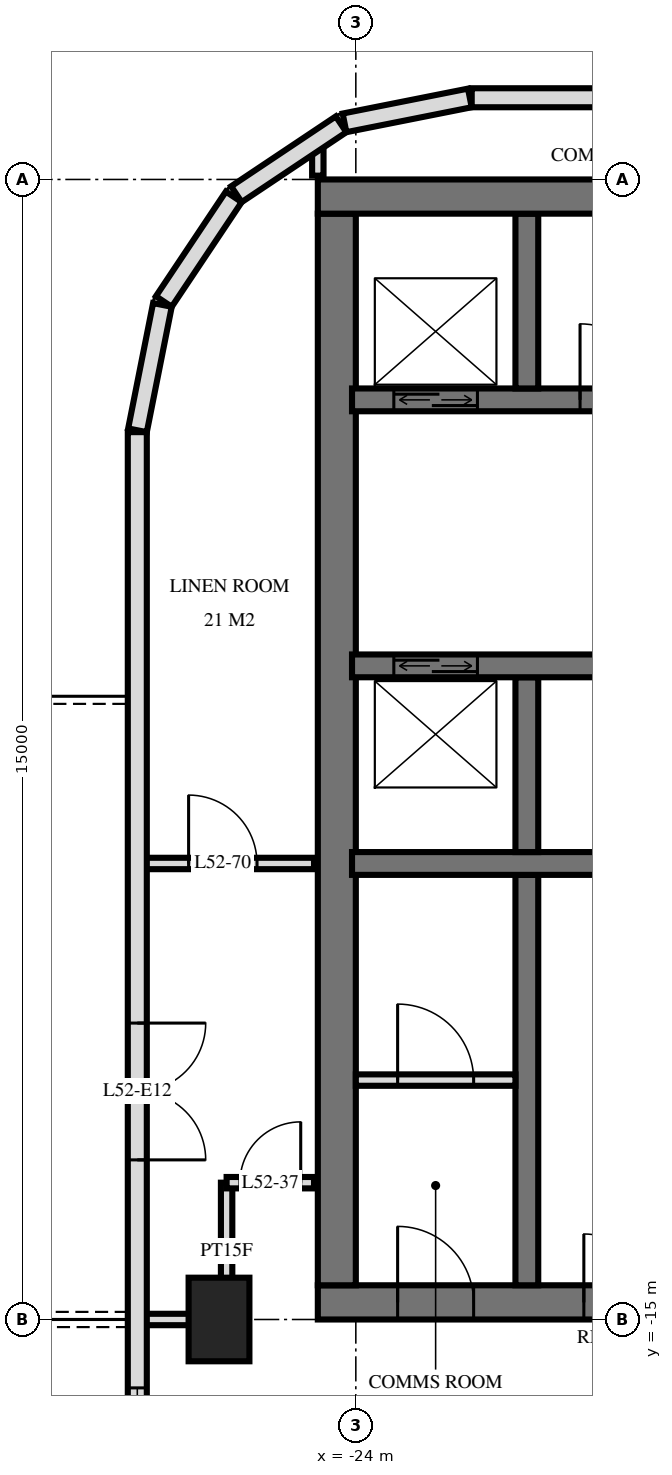
"""IFC4 building model, lengths in metres.
Left out: names, types, materials, properties, quantities, classifications, styles, units other than length and angle.
Written with IfcOpenShell. Run it as: python <this file> out.ifc"""

import sys

from ifc_helpers import new_model, si_unit, direction, frame, frame_2d, origin, origin_2d, place, context, subcontext, project, spatial, rectangle, extrude, element, fill, save


model = new_model("IFC4")
c1 = context("Model", 3, precision=1e-05, world=origin(), true_north=direction((0.0, 1.0)))
c2 = subcontext(c1, "Body", "Model", "MODEL_VIEW")
j1 = project(units=[si_unit("LENGTHUNIT", "METRE"), si_unit("PLANEANGLEUNIT", "RADIAN")], contexts=[c1])
p1 = place(None, origin())
s1 = spatial("IfcSite", under=j1, at=p1, CompositionType="ELEMENT")
p2 = place(p1, origin())
s2 = spatial("IfcBuilding", under=s1, at=p2, CompositionType="ELEMENT")
p3 = place(p2, frame((0.0, 0.0, 201.1)))
s3 = spatial("IfcBuildingStorey", under=s2, at=p3, CompositionType="ELEMENT", Elevation=201.1)
p4 = place(p3, frame((-25.8, -15.0, 0.0), z_axis=(0.0, 0.0, 1.0), x_axis=(0.0, 1.0, 0.0)))
e1 = element("IfcColumn", 1, at=p4, inside=s3, PredefinedType="COLUMN", context=c2, shape_type="SweptSolid", body=[
    extrude(rectangle(XDim=1.1, YDim=0.8, at=origin_2d()), origin(), (0.0, 0.0, 1.0), 3.5),
])
p5 = place(p3, frame((-24.5, -0.225, 0.0), z_axis=(0.0, 0.0, 1.0), x_axis=(1.0, 0.0, 0.0)))
e2 = element("IfcWall", 2, at=p5, inside=s3, PredefinedType="SHEAR", context=c2, shape_type="SweptSolid", body=[
    extrude(rectangle(XDim=14.5, YDim=0.45, at=frame_2d((7.25, 0.0))), origin(), (0.0, 0.0, 1.0), 3.5),
])
p6 = place(p3, frame((-24.5, -14.775, 0.0), z_axis=(0.0, 0.0, 1.0), x_axis=(1.0, 0.0, 0.0)))
e3 = element("IfcWall", 3, at=p6, inside=s3, PredefinedType="SHEAR", context=c2, shape_type="SweptSolid", body=[
    extrude(rectangle(XDim=14.5, YDim=0.45, at=frame_2d((7.25, 0.0))), origin(), (0.0, 0.0, 1.0), 3.5),
])
p7 = place(p6, frame((6.2, 0.0, 0.0)))
e4 = element("IfcOpeningElement", 4, at=p7, cuts=e3, PredefinedType="OPENING", context=c2, shape_type="SweptSolid", body=[
    extrude(rectangle(XDim=1.2, YDim=2.1, at=frame_2d((0.6, 1.05))), frame((0.0, 0.235, 0.0), z_axis=(0.0, -1.0, 0.0), x_axis=(1.0, 0.0, 0.0)), (0.0, 0.0, 1.0), 0.47),
])
p8 = place(p6, frame((9.25, 0.0, 0.0)))
e5 = element("IfcOpeningElement", 5, at=p8, cuts=e3, PredefinedType="OPENING", context=c2, shape_type="SweptSolid", body=[
    extrude(rectangle(XDim=1.1, YDim=2.1, at=frame_2d((0.55, 1.05))), frame((0.0, 0.235, 0.0), z_axis=(0.0, -1.0, 0.0), x_axis=(1.0, 0.0, 0.0)), (0.0, 0.0, 1.0), 0.47),
])
p9 = place(p6, frame((3.5, 0.0, 0.0)))
e6 = element("IfcOpeningElement", 6, at=p9, cuts=e3, PredefinedType="OPENING", context=c2, shape_type="SweptSolid", body=[
    extrude(rectangle(XDim=0.9, YDim=2.1, at=frame_2d((0.45, 1.05))), frame((0.0, 0.235, 0.0), z_axis=(0.0, -1.0, 0.0), x_axis=(1.0, 0.0, 0.0)), (0.0, 0.0, 1.0), 0.47),
])
p10 = place(p6, frame((1.05, 0.0, 0.0)))
e7 = element("IfcOpeningElement", 7, at=p10, cuts=e3, PredefinedType="OPENING", context=c2, shape_type="SweptSolid", body=[
    extrude(rectangle(XDim=1.0, YDim=2.1, at=frame_2d((0.5, 1.05))), frame((0.0, 0.235, 0.0), z_axis=(0.0, -1.0, 0.0), x_axis=(1.0, 0.0, 0.0)), (0.0, 0.0, 1.0), 0.47),
])
p11 = place(p3, frame((-24.25, -14.55, 0.0), z_axis=(0.0, 0.0, 1.0), x_axis=(0.0, 1.0, 0.0)))
e8 = element("IfcWall", 8, at=p11, inside=s3, PredefinedType="SHEAR", context=c2, shape_type="SweptSolid", body=[
    extrude(rectangle(XDim=14.1, YDim=0.5, at=frame_2d((7.05, 0.0))), origin(), (0.0, 0.0, 1.0), 3.5),
])
p12 = place(p3, frame((-24.05, -2.9, 0.0), z_axis=(0.0, 0.0, 1.0), x_axis=(1.0, 0.0, 0.0)))
e9 = element("IfcWall", 9, at=p12, inside=s3, PredefinedType="SHEAR", context=c2, shape_type="SweptSolid", body=[
    extrude(rectangle(XDim=13.7, YDim=0.3, at=frame_2d((6.85, 0.0))), origin(), (0.0, 0.0, 1.0), 3.5),
])
p13 = place(p12, frame((0.55, 0.0, 0.0)))
e10 = element("IfcOpeningElement", 10, at=p13, cuts=e9, PredefinedType="OPENING", context=c2, shape_type="SweptSolid", body=[
    extrude(rectangle(XDim=1.1, YDim=2.1, at=frame_2d((0.55, 1.05))), frame((0.0, 0.16, 0.0), z_axis=(0.0, -1.0, 0.0), x_axis=(1.0, 0.0, 0.0)), (0.0, 0.0, 1.0), 0.32),
])
p14 = place(p12, frame((6.613, 0.0, 0.0)))
e11 = element("IfcOpeningElement", 11, at=p14, cuts=e9, PredefinedType="OPENING", context=c2, shape_type="SweptSolid", body=[
    extrude(rectangle(XDim=0.9, YDim=2.1, at=frame_2d((0.45, 1.05))), frame((0.0, 0.16, 0.0), z_axis=(0.0, -1.0, 0.0), x_axis=(1.0, 0.0, 0.0)), (0.0, 0.0, 1.0), 0.32),
])
p15 = place(p12, frame((5.188, 0.0, 0.0)))
e12 = element("IfcOpeningElement", 12, at=p15, cuts=e9, PredefinedType="OPENING", context=c2, shape_type="SweptSolid", body=[
    extrude(rectangle(XDim=0.9, YDim=2.1, at=frame_2d((0.45, 1.05))), frame((0.0, 0.16, 0.0), z_axis=(0.0, -1.0, 0.0), x_axis=(1.0, 0.0, 0.0)), (0.0, 0.0, 1.0), 0.32),
])
p16 = place(p12, frame((12.562, 0.0, 0.0)))
e13 = element("IfcOpeningElement", 13, at=p16, cuts=e9, PredefinedType="OPENING", context=c2, shape_type="SweptSolid", body=[
    extrude(rectangle(XDim=1.0, YDim=2.1, at=frame_2d((0.5, 1.05))), frame((0.0, 0.16, 0.0), z_axis=(0.0, -1.0, 0.0), x_axis=(1.0, 0.0, 0.0)), (0.0, 0.0, 1.0), 0.32),
])
p17 = place(p12, frame((11.137, 0.0, 0.0)))
e14 = element("IfcOpeningElement", 14, at=p17, cuts=e9, PredefinedType="OPENING", context=c2, shape_type="SweptSolid", body=[
    extrude(rectangle(XDim=1.0, YDim=2.1, at=frame_2d((0.5, 1.05))), frame((0.0, 0.16, 0.0), z_axis=(0.0, -1.0, 0.0), x_axis=(1.0, 0.0, 0.0)), (0.0, 0.0, 1.0), 0.32),
])
p18 = place(p12, frame((8.85, 0.0, 0.0)))
e15 = element("IfcOpeningElement", 15, at=p18, cuts=e9, PredefinedType="OPENING", context=c2, shape_type="SweptSolid", body=[
    extrude(rectangle(XDim=1.0, YDim=2.1, at=frame_2d((0.5, 1.05))), frame((0.0, 0.16, 0.0), z_axis=(0.0, -1.0, 0.0), x_axis=(1.0, 0.0, 0.0)), (0.0, 0.0, 1.0), 0.32),
])
p19 = place(p12, frame((3.0, 0.0, 0.0)))
e16 = element("IfcOpeningElement", 16, at=p19, cuts=e9, PredefinedType="OPENING", context=c2, shape_type="SweptSolid", body=[
    extrude(rectangle(XDim=1.0, YDim=2.1, at=frame_2d((0.5, 1.05))), frame((0.0, 0.16, 0.0), z_axis=(0.0, -1.0, 0.0), x_axis=(1.0, 0.0, 0.0)), (0.0, 0.0, 1.0), 0.32),
])
p20 = place(p3, frame((-24.05, -6.4, 0.0), z_axis=(0.0, 0.0, 1.0), x_axis=(1.0, 0.0, 0.0)))
e17 = element("IfcWall", 17, at=p20, inside=s3, PredefinedType="SHEAR", context=c2, shape_type="SweptSolid", body=[
    extrude(rectangle(XDim=13.7, YDim=0.3, at=frame_2d((6.85, 0.0))), origin(), (0.0, 0.0, 1.0), 3.5),
])
p21 = place(p20, frame((0.55, 0.0, 0.0)))
e18 = element("IfcOpeningElement", 18, at=p21, cuts=e17, PredefinedType="OPENING", context=c2, shape_type="SweptSolid", body=[
    extrude(rectangle(XDim=1.1, YDim=2.1, at=frame_2d((0.55, 1.05))), frame((0.0, 0.16, 0.0), z_axis=(0.0, -1.0, 0.0), x_axis=(1.0, 0.0, 0.0)), (0.0, 0.0, 1.0), 0.32),
])
p22 = place(p20, frame((5.8, 0.0, 0.0)))
e19 = element("IfcOpeningElement", 19, at=p22, cuts=e17, PredefinedType="OPENING", context=c2, shape_type="SweptSolid", body=[
    extrude(rectangle(XDim=1.1, YDim=2.1, at=frame_2d((0.55, 1.05))), frame((0.0, 0.16, 0.0), z_axis=(0.0, -1.0, 0.0), x_axis=(1.0, 0.0, 0.0)), (0.0, 0.0, 1.0), 0.32),
])
p23 = place(p3, frame((-24.05, -9.0, 0.0), z_axis=(0.0, 0.0, 1.0), x_axis=(1.0, 0.0, 0.0)))
e20 = element("IfcWall", 20, at=p23, inside=s3, PredefinedType="SHEAR", context=c2, shape_type="SweptSolid", body=[
    extrude(rectangle(XDim=13.7, YDim=0.3, at=frame_2d((6.85, 0.0))), origin(), (0.0, 0.0, 1.0), 3.5),
])
p24 = place(p23, frame((8.8, 0.0, 0.0)))
e21 = element("IfcOpeningElement", 21, at=p24, cuts=e20, PredefinedType="OPENING", context=c2, shape_type="SweptSolid", body=[
    extrude(rectangle(XDim=1.1, YDim=2.1, at=frame_2d((0.55, 1.05))), frame((0.0, 0.16, 0.0), z_axis=(0.0, -1.0, 0.0), x_axis=(1.0, 0.0, 0.0)), (0.0, 0.0, 1.0), 0.32),
])
for number, where, z_axis, x_axis in (
    (22, (-21.75, -2.75, 0.0), (0.0, 0.0, 1.0), (0.0, 1.0, 0.0)),
    (23, (-21.75, -8.85, 0.0), (0.0, 0.0, 1.0), (0.0, 1.0, 0.0)),
):
    element("IfcWall", number, at=place(p3, frame(where, z_axis=z_axis, x_axis=x_axis)), inside=s3, PredefinedType="SHEAR", context=c2, shape_type="SweptSolid", body=[
        extrude(rectangle(XDim=2.3, YDim=0.3, at=frame_2d((1.15, 0.0))), origin(), (0.0, 0.0, 1.0), 3.5),
    ])
p25 = place(p3, frame((-21.75, -14.55, 0.0), z_axis=(0.0, 0.0, 1.0), x_axis=(0.0, 1.0, 0.0)))
e24 = element("IfcWall", 24, at=p25, inside=s3, PredefinedType="SHEAR", context=c2, shape_type="SweptSolid", body=[
    extrude(rectangle(XDim=5.4, YDim=0.3, at=frame_2d((2.7, 0.0))), origin(), (0.0, 0.0, 1.0), 3.5),
])
p26 = place(p3, frame((22.475, 1.075, 0.0), z_axis=(0.0, 0.0, 1.0), x_axis=(-1.0, 0.0, 0.0)))
e25 = element("IfcWall", 25, at=p26, inside=s3, PredefinedType="SOLIDWALL", context=c2, shape_type="SweptSolid", body=[
    extrude(rectangle(XDim=44.951, YDim=0.25, at=frame_2d((22.475, 0.0))), origin(), (0.0, 0.0, 1.0), 3.22),
])
p27 = place(p26, frame((13.775, 0.0, 0.9)))
e26 = element("IfcOpeningElement", 26, at=p27, cuts=e25, PredefinedType="OPENING", context=c2, shape_type="SweptSolid", body=[
    extrude(rectangle(XDim=2.4, YDim=1.5, at=frame_2d((1.2, 0.75))), frame((0.0, 0.135, 0.0), z_axis=(0.0, -1.0, 0.0), x_axis=(1.0, 0.0, 0.0)), (0.0, 0.0, 1.0), 0.27),
])
p28 = place(p26, frame((18.275, 0.0, 0.9)))
e27 = element("IfcOpeningElement", 27, at=p28, cuts=e25, PredefinedType="OPENING", context=c2, shape_type="SweptSolid", body=[
    extrude(rectangle(XDim=2.4, YDim=1.5, at=frame_2d((1.2, 0.75))), frame((0.0, 0.135, 0.0), z_axis=(0.0, -1.0, 0.0), x_axis=(1.0, 0.0, 0.0)), (0.0, 0.0, 1.0), 0.27),
])
p29 = place(p26, frame((29.025, 0.0, 0.9)))
e28 = element("IfcOpeningElement", 28, at=p29, cuts=e25, PredefinedType="OPENING", context=c2, shape_type="SweptSolid", body=[
    extrude(rectangle(XDim=2.4, YDim=1.5, at=frame_2d((1.2, 0.75))), frame((0.0, 0.135, 0.0), z_axis=(0.0, -1.0, 0.0), x_axis=(1.0, 0.0, 0.0)), (0.0, 0.0, 1.0), 0.27),
])
p30 = place(p3, frame((-22.5, 1.073, 0.0), z_axis=(0.0, 0.0, 1.0), x_axis=(-0.980803419081, -0.194999110559, 0.0)))
e29 = element("IfcWall", 29, at=p30, inside=s3, PredefinedType="SOLIDWALL", context=c2, shape_type="SweptSolid", body=[
    extrude(rectangle(XDim=1.681, YDim=0.25, at=frame_2d((0.841, 0.0))), origin(), (0.0, 0.0, 1.0), 3.22),
])
for number, where, z_axis, x_axis in (
    (30, (-24.194, 0.726, 0.0), (0.0, 0.0, 1.0), (-0.831, -0.556, 0.0)),
    (31, (-25.606, -0.229, 0.0), (0.0, 0.0, 1.0), (-0.556, -0.831, 0.0)),
):
    element("IfcWall", number, at=place(p3, frame(where, z_axis=z_axis, x_axis=x_axis)), inside=s3, PredefinedType="SOLIDWALL", context=c2, shape_type="SweptSolid", body=[
        extrude(rectangle(XDim=1.656, YDim=0.25, at=frame_2d((0.828, 0.0))), origin(), (0.0, 0.0, 1.0), 3.22),
    ])
p31 = place(p3, frame((-26.545, -1.651, 0.0), z_axis=(0.0, 0.0, 1.0), x_axis=(-0.194999110559, -0.980803419081, 0.0)))
e32 = element("IfcWall", 32, at=p31, inside=s3, PredefinedType="SOLIDWALL", context=c2, shape_type="SweptSolid", body=[
    extrude(rectangle(XDim=1.681, YDim=0.25, at=frame_2d((0.841, 0.0))), origin(), (0.0, 0.0, 1.0), 3.22),
])
p32 = place(p3, frame((-26.875, -3.325, 0.0), z_axis=(0.0, 0.0, 1.0), x_axis=(0.0, -1.0, 0.0)))
e33 = element("IfcWall", 33, at=p32, inside=s3, PredefinedType="SOLIDWALL", context=c2, shape_type="SweptSolid", body=[
    extrude(rectangle(XDim=21.551, YDim=0.25, at=frame_2d((10.775, 0.0))), origin(), (0.0, 0.0, 1.0), 3.22),
])
p33 = place(p32, frame((7.775, 0.0, 0.0)))
e34 = element("IfcOpeningElement", 34, at=p33, cuts=e33, PredefinedType="OPENING", context=c2, shape_type="SweptSolid", body=[
    extrude(rectangle(XDim=1.8, YDim=2.4, at=frame_2d((0.9, 1.2))), frame((0.0, 0.135, 0.0), z_axis=(0.0, -1.0, 0.0), x_axis=(1.0, 0.0, 0.0)), (0.0, 0.0, 1.0), 0.27),
])
p34 = place(p32, frame((12.575, 0.0, 0.9)))
e35 = element("IfcOpeningElement", 35, at=p34, cuts=e33, PredefinedType="OPENING", context=c2, shape_type="SweptSolid", body=[
    extrude(rectangle(XDim=1.2, YDim=1.5, at=frame_2d((0.6, 0.75))), frame((0.0, 0.135, 0.0), z_axis=(0.0, -1.0, 0.0), x_axis=(1.0, 0.0, 0.0)), (0.0, 0.0, 1.0), 0.27),
])
p35 = place(p32, frame((15.275, 0.0, 0.0)))
e36 = element("IfcOpeningElement", 36, at=p35, cuts=e33, PredefinedType="OPENING", context=c2, shape_type="SweptSolid", body=[
    extrude(rectangle(XDim=1.8, YDim=2.4, at=frame_2d((0.9, 1.2))), frame((0.0, 0.135, 0.0), z_axis=(0.0, -1.0, 0.0), x_axis=(1.0, 0.0, 0.0)), (0.0, 0.0, 1.0), 0.27),
])
p36 = place(p32, frame((19.325, 0.0, 0.0)))
e37 = element("IfcOpeningElement", 37, at=p36, cuts=e33, PredefinedType="OPENING", context=c2, shape_type="SweptSolid", body=[
    extrude(rectangle(XDim=1.8, YDim=2.4, at=frame_2d((0.9, 1.2))), frame((0.0, 0.135, 0.0), z_axis=(0.0, -1.0, 0.0), x_axis=(1.0, 0.0, 0.0)), (0.0, 0.0, 1.0), 0.27),
])
p37 = place(p3, frame((-24.0, -11.85, 0.0), z_axis=(0.0, 0.0, 1.0), x_axis=(1.0, 0.0, 0.0)))
e38 = element("IfcWall", 38, at=p37, inside=s3, PredefinedType="PARTITIONING", context=c2, shape_type="SweptSolid", body=[
    extrude(rectangle(XDim=2.1, YDim=0.15, at=frame_2d((1.05, 0.0))), origin(), (0.0, 0.0, 1.0), 3.2),
])
p38 = place(p37, frame((0.55, 0.0, 0.0)))
e39 = element("IfcOpeningElement", 39, at=p38, cuts=e38, PredefinedType="OPENING", context=c2, shape_type="SweptSolid", body=[
    extrude(rectangle(XDim=1.0, YDim=2.1, at=frame_2d((0.5, 1.05))), frame((0.0, 0.085, 0.0), z_axis=(0.0, -1.0, 0.0), x_axis=(1.0, 0.0, 0.0)), (0.0, 0.0, 1.0), 0.17),
])
p39 = place(p3, frame((-24.5, 0.05, 0.0), z_axis=(0.0, 0.0, 1.0), x_axis=(0.0, 1.0, 0.0)))
e40 = element("IfcWall", 40, at=p39, inside=s3, PredefinedType="PARTITIONING", context=c2, shape_type="SweptSolid", body=[
    extrude(rectangle(XDim=0.405, YDim=0.15, at=frame_2d((0.203, 0.0))), origin(), (0.0, 0.0, 1.0), 3.22),
])
p40 = place(p3, frame((-25.7, -15.0, 0.0), z_axis=(0.0, 0.0, 1.0), x_axis=(0.0, 1.0, 0.0)))
e41 = element("IfcWall", 41, at=p40, inside=s3, PredefinedType="PARTITIONING", context=c2, shape_type="SweptSolid", body=[
    extrude(rectangle(XDim=1.8, YDim=0.15, at=frame_2d((0.9, 0.0))), origin(), (0.0, 0.0, 1.0), 3.22),
])
p41 = place(p3, frame((-26.82, -15.0, 0.0), z_axis=(0.0, 0.0, 1.0), x_axis=(1.0, 0.0, 0.0)))
e42 = element("IfcWall", 42, at=p41, inside=s3, PredefinedType="PARTITIONING", context=c2, shape_type="SweptSolid", body=[
    extrude(rectangle(XDim=1.12, YDim=0.15, at=frame_2d((0.56, 0.0))), origin(), (0.0, 0.0, 1.0), 3.22),
])
p42 = place(p3, frame((-25.7, -13.2, 0.0), z_axis=(0.0, 0.0, 1.0), x_axis=(1.0, 0.0, 0.0)))
e43 = element("IfcWall", 43, at=p42, inside=s3, PredefinedType="PARTITIONING", context=c2, shape_type="SweptSolid", body=[
    extrude(rectangle(XDim=1.15, YDim=0.15, at=frame_2d((0.575, 0.0))), origin(), (0.0, 0.0, 1.0), 3.22),
])
p43 = place(p42, frame((0.175, 0.0, 0.0)))
e44 = element("IfcOpeningElement", 44, at=p43, cuts=e43, PredefinedType="OPENING", context=c2, shape_type="SweptSolid", body=[
    extrude(rectangle(XDim=0.8, YDim=2.1, at=frame_2d((0.4, 1.05))), frame((0.0, 0.085, 0.0), z_axis=(0.0, -1.0, 0.0), x_axis=(1.0, 0.0, 0.0)), (0.0, 0.0, 1.0), 0.17),
])
p44 = place(p3, frame((-26.82, -9.0, 0.0), z_axis=(0.0, 0.0, 1.0), x_axis=(1.0, 0.0, 0.0)))
e45 = element("IfcWall", 45, at=p44, inside=s3, PredefinedType="PARTITIONING", context=c2, shape_type="SweptSolid", body=[
    extrude(rectangle(XDim=2.27, YDim=0.15, at=frame_2d((1.135, 0.0))), origin(), (0.0, 0.0, 1.0), 3.22),
])
p45 = place(p44, frame((0.62, 0.0, 0.0)))
e46 = element("IfcOpeningElement", 46, at=p45, cuts=e45, PredefinedType="OPENING", context=c2, shape_type="SweptSolid", body=[
    extrude(rectangle(XDim=0.9, YDim=2.1, at=frame_2d((0.45, 1.05))), frame((0.0, 0.085, 0.0), z_axis=(0.0, -1.0, 0.0), x_axis=(1.0, 0.0, 0.0)), (0.0, 0.0, 1.0), 0.17),
])
p46 = place(p33, origin())
e47 = element("IfcDoor", 47, at=p46, inside=s3, OperationType="DOUBLE_DOOR_SINGLE_SWING", PredefinedType="DOOR", context=c2, shape_type="SweptSolid", body=[
    extrude(rectangle(XDim=1.8, YDim=2.4, at=frame_2d((0.9, 1.2))), frame((0.0, 0.025, 0.0), z_axis=(0.0, -1.0, 0.0), x_axis=(1.0, 0.0, 0.0)), (0.0, 0.0, 1.0), 0.05),
])
fill(e34, e47)
p47 = place(p34, origin())
e48 = element("IfcWindow", 48, at=p47, inside=s3, PartitioningType="SINGLE_PANEL", PredefinedType="WINDOW", context=c2, shape_type="SweptSolid", body=[
    extrude(rectangle(XDim=1.2, YDim=1.5, at=frame_2d((0.6, 0.75))), frame((0.0, 0.03, 0.0), z_axis=(0.0, -1.0, 0.0), x_axis=(1.0, 0.0, 0.0)), (0.0, 0.0, 1.0), 0.06),
])
fill(e35, e48)
p48 = place(p13, origin())
e49 = element("IfcDoor", 49, at=p48, inside=s3, OperationType="DOUBLE_DOOR_SLIDING", PredefinedType="USERDEFINED", context=c2, shape_type="SweptSolid", body=[
    extrude(rectangle(XDim=1.1, YDim=2.1, at=frame_2d((0.55, 1.05))), frame((0.0, 0.025, 0.0), z_axis=(0.0, -1.0, 0.0), x_axis=(1.0, 0.0, 0.0)), (0.0, 0.0, 1.0), 0.05),
])
fill(e10, e49)
p49 = place(p21, origin())
e50 = element("IfcDoor", 50, at=p49, inside=s3, OperationType="DOUBLE_DOOR_SLIDING", PredefinedType="USERDEFINED", context=c2, shape_type="SweptSolid", body=[
    extrude(rectangle(XDim=1.1, YDim=2.1, at=frame_2d((0.55, 1.05))), frame((0.0, 0.025, 0.0), z_axis=(0.0, -1.0, 0.0), x_axis=(1.0, 0.0, 0.0)), (0.0, 0.0, 1.0), 0.05),
])
fill(e18, e50)
p50 = place(p9, origin())
e51 = element("IfcDoor", 51, at=p50, inside=s3, OperationType="SINGLE_SWING_RIGHT", PredefinedType="DOOR", context=c2, shape_type="SweptSolid", body=[
    extrude(rectangle(XDim=0.9, YDim=2.1, at=frame_2d((0.45, 1.05))), frame((0.0, 0.025, 0.0), z_axis=(0.0, -1.0, 0.0), x_axis=(1.0, 0.0, 0.0)), (0.0, 0.0, 1.0), 0.05),
])
fill(e6, e51)
p51 = place(p10, origin())
e52 = element("IfcDoor", 52, at=p51, inside=s3, OperationType="SINGLE_SWING_RIGHT", PredefinedType="DOOR", context=c2, shape_type="SweptSolid", body=[
    extrude(rectangle(XDim=1.0, YDim=2.1, at=frame_2d((0.5, 1.05))), frame((0.0, 0.025, 0.0), z_axis=(0.0, -1.0, 0.0), x_axis=(1.0, 0.0, 0.0)), (0.0, 0.0, 1.0), 0.05),
])
fill(e7, e52)
p52 = place(p19, origin())
e53 = element("IfcDoor", 53, at=p52, inside=s3, OperationType="SINGLE_SWING_RIGHT", PredefinedType="DOOR", context=c2, shape_type="SweptSolid", body=[
    extrude(rectangle(XDim=1.0, YDim=2.1, at=frame_2d((0.5, 1.05))), frame((0.0, 0.025, 0.0), z_axis=(0.0, -1.0, 0.0), x_axis=(1.0, 0.0, 0.0)), (0.0, 0.0, 1.0), 0.05),
])
fill(e16, e53)
p53 = place(p38, origin())
e54 = element("IfcDoor", 54, at=p53, inside=s3, OperationType="SINGLE_SWING_RIGHT", PredefinedType="DOOR", context=c2, shape_type="SweptSolid", body=[
    extrude(rectangle(XDim=1.0, YDim=2.1, at=frame_2d((0.5, 1.05))), frame((0.0, 0.025, 0.0), z_axis=(0.0, -1.0, 0.0), x_axis=(1.0, 0.0, 0.0)), (0.0, 0.0, 1.0), 0.05),
])
fill(e39, e54)
p54 = place(p43, origin())
e55 = element("IfcDoor", 55, at=p54, inside=s3, OperationType="SINGLE_SWING_LEFT", PredefinedType="DOOR", context=c2, shape_type="SweptSolid", body=[
    extrude(rectangle(XDim=0.8, YDim=2.1, at=frame_2d((0.4, 1.05))), frame((0.0, 0.025, 0.0), z_axis=(0.0, -1.0, 0.0), x_axis=(1.0, 0.0, 0.0)), (0.0, 0.0, 1.0), 0.05),
])
fill(e44, e55)
p55 = place(p45, origin())
e56 = element("IfcDoor", 56, at=p55, inside=s3, OperationType="SINGLE_SWING_RIGHT", PredefinedType="DOOR", context=c2, shape_type="SweptSolid", body=[
    extrude(rectangle(XDim=0.9, YDim=2.1, at=frame_2d((0.45, 1.05))), frame((0.0, 0.025, 0.0), z_axis=(0.0, -1.0, 0.0), x_axis=(1.0, 0.0, 0.0)), (0.0, 0.0, 1.0), 0.05),
])
fill(e46, e56)
save(model, sys.argv[1])
